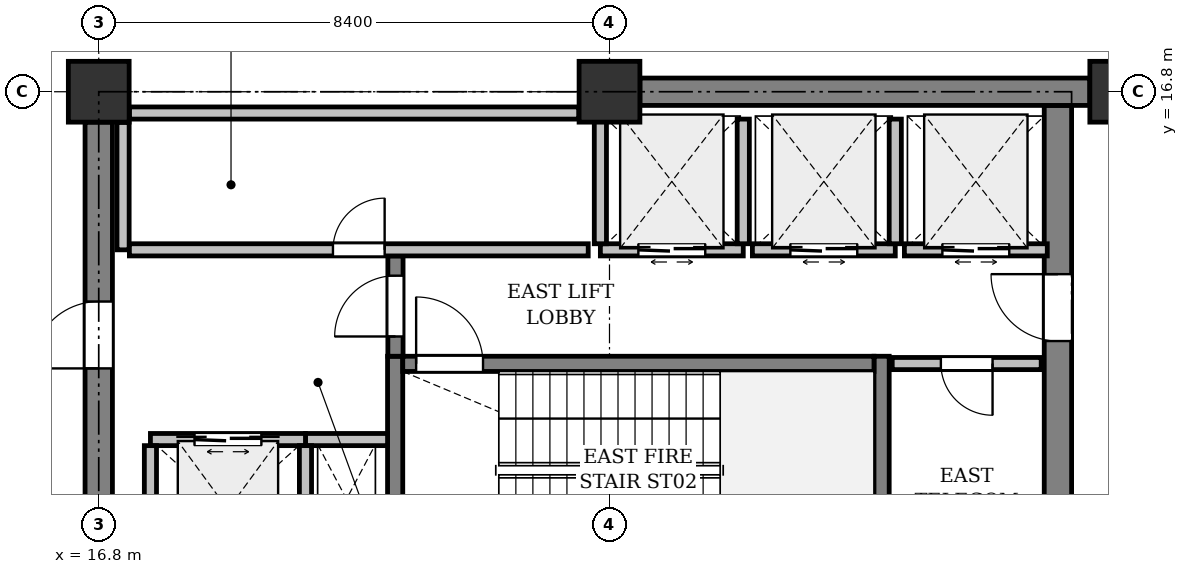
"""IFC4 building model, lengths in metres.
Left out: names, types, materials, properties, quantities, classifications, styles, units other than length and angle.
Written with IfcOpenShell. Run it as: python <this file> out.ifc"""

import sys

from ifc_helpers import new_model, si_unit, direction, frame, frame_2d, origin, origin_2d, place, context, subcontext, project, spatial, rectangle, extrude, element, fill, save


model = new_model("IFC4")
c1 = context("Model", 3, precision=1e-05, world=origin(), true_north=direction((0.0, 1.0)))
c2 = subcontext(c1, "Body", "Model", "MODEL_VIEW")
j1 = project(units=[si_unit("LENGTHUNIT", "METRE"), si_unit("PLANEANGLEUNIT", "RADIAN")], contexts=[c1])
p1 = place(None, origin())
s1 = spatial("IfcSite", under=j1, at=p1, CompositionType="ELEMENT")
p2 = place(p1, origin())
s2 = spatial("IfcBuilding", under=s1, at=p2, CompositionType="ELEMENT")
p3 = place(p2, frame((0.0, 0.0, 245.2)))
s3 = spatial("IfcBuildingStorey", under=s2, at=p3, CompositionType="ELEMENT", Elevation=245.2)
for number, where, z_axis, x_axis in (
    (1, (16.8, 16.8, 0.0), (0.0, 0.0, 1.0), (1.0, 0.0, 0.0)),
    (2, (25.2, 16.8, 0.0), (0.0, 0.0, 1.0), (1.0, 0.0, 0.0)),
    (3, (33.6, 16.8, 0.0), (0.0, 0.0, 1.0), (1.0, 0.0, 0.0)),
):
    element("IfcColumn", number, at=place(p3, frame(where, z_axis=z_axis, x_axis=x_axis)), inside=s3, PredefinedType="COLUMN", context=c2, shape_type="SweptSolid", body=[
        extrude(rectangle(XDim=1.0, YDim=1.0, at=origin_2d()), origin(), (0.0, 0.0, 1.0), 5.0),
    ])
p4 = place(p3, frame((32.575, 8.625, 0.0), z_axis=(0.0, 0.0, 1.0), x_axis=(0.0, 1.0, 0.0)))
e4 = element("IfcWall", 4, at=p4, inside=s3, PredefinedType="SHEAR", context=c2, shape_type="SweptSolid", body=[
    extrude(rectangle(XDim=7.95, YDim=0.45, at=frame_2d((3.975, 0.0))), origin(), (0.0, 0.0, 1.0), 4.725),
])
p5 = place(p4, frame((4.075, 0.0, 0.0)))
e5 = element("IfcOpeningElement", 5, at=p5, cuts=e4, PredefinedType="OPENING", context=c2, shape_type="SweptSolid", body=[
    extrude(rectangle(XDim=1.1, YDim=2.15, at=frame_2d((0.55, 1.075))), frame((0.0, 0.235, 0.0), z_axis=(0.0, -1.0, 0.0), x_axis=(1.0, 0.0, 0.0)), (0.0, 0.0, 1.0), 0.47),
])
p6 = place(p3, frame((16.8, 8.9, 0.0), z_axis=(0.0, 0.0, 1.0), x_axis=(0.0, 1.0, 0.0)))
e6 = element("IfcWall", 6, at=p6, inside=s3, PredefinedType="SHEAR", context=c2, shape_type="SweptSolid", body=[
    extrude(rectangle(XDim=7.4, YDim=0.45, at=frame_2d((3.7, 0.0))), origin(), (0.0, 0.0, 1.0), 4.725),
])
p7 = place(p6, frame((3.35, 0.0, 0.0)))
e7 = element("IfcOpeningElement", 7, at=p7, cuts=e6, PredefinedType="OPENING", context=c2, shape_type="SweptSolid", body=[
    extrude(rectangle(XDim=1.1, YDim=2.15, at=frame_2d((0.55, 1.075))), frame((0.0, 0.235, 0.0), z_axis=(0.0, -1.0, 0.0), x_axis=(1.0, 0.0, 0.0)), (0.0, 0.0, 1.0), 0.47),
])
p8 = place(p3, frame((25.7, 16.8, 0.0), z_axis=(0.0, 0.0, 1.0), x_axis=(1.0, 0.0, 0.0)))
e8 = element("IfcWall", 8, at=p8, inside=s3, PredefinedType="SHEAR", context=c2, shape_type="SweptSolid", body=[
    extrude(rectangle(XDim=7.4, YDim=0.45, at=frame_2d((3.7, 0.0))), origin(), (0.0, 0.0, 1.0), 4.725),
])
for number, where, z_axis, x_axis in (
    (9, (21.675, 8.7, 0.0), (0.0, 0.0, 1.0), (0.0, 1.0, 0.0)),
    (10, (29.675, 8.7, 0.0), (0.0, 0.0, 1.0), (0.0, 1.0, 0.0)),
):
    element("IfcWall", number, at=place(p3, frame(where, z_axis=z_axis, x_axis=x_axis)), inside=s3, PredefinedType="SHEAR", context=c2, shape_type="SweptSolid", body=[
        extrude(rectangle(XDim=3.75, YDim=0.25, at=frame_2d((1.875, 0.0))), origin(), (0.0, 0.0, 1.0), 4.725),
    ])
p9 = place(p3, frame((21.8, 12.325, 0.0), z_axis=(0.0, 0.0, 1.0), x_axis=(1.0, 0.0, 0.0)))
e11 = element("IfcWall", 11, at=p9, inside=s3, PredefinedType="SHEAR", context=c2, shape_type="SweptSolid", body=[
    extrude(rectangle(XDim=7.75, YDim=0.25, at=frame_2d((3.875, 0.0))), origin(), (0.0, 0.0, 1.0), 4.725),
])
p10 = place(p9, frame((0.22, 0.0, 0.0)))
e12 = element("IfcOpeningElement", 12, at=p10, cuts=e11, PredefinedType="OPENING", context=c2, shape_type="SweptSolid", body=[
    extrude(rectangle(XDim=1.1, YDim=2.15, at=frame_2d((0.55, 1.075))), frame((0.0, 0.135, 0.0), z_axis=(0.0, -1.0, 0.0), x_axis=(1.0, 0.0, 0.0)), (0.0, 0.0, 1.0), 0.27),
])
p11 = place(p3, frame((20.2, 11.08, 0.0), z_axis=(0.0, 0.0, 1.0), x_axis=(1.0, 0.0, 0.0)))
e13 = element("IfcWall", 13, at=p11, inside=s3, PredefinedType="PARTITIONING", context=c2, shape_type="SweptSolid", body=[
    extrude(rectangle(XDim=1.35, YDim=0.2, at=frame_2d((0.675, 0.0))), origin(), (0.0, 0.0, 1.0), 4.725),
])
p12 = place(p3, frame((21.68, 12.45, 0.0), z_axis=(0.0, 0.0, 1.0), x_axis=(0.0, 1.0, 0.0)))
e14 = element("IfcWall", 14, at=p12, inside=s3, PredefinedType="SHEAR", context=c2, shape_type="SweptSolid", body=[
    extrude(rectangle(XDim=1.65, YDim=0.25, at=frame_2d((0.825, 0.0))), origin(), (0.0, 0.0, 1.0), 4.725),
])
p13 = place(p12, frame((0.325, 0.0, 0.0)))
e15 = element("IfcOpeningElement", 15, at=p13, cuts=e14, PredefinedType="OPENING", context=c2, shape_type="SweptSolid", body=[
    extrude(rectangle(XDim=1.0, YDim=2.15, at=frame_2d((0.5, 1.075))), frame((0.0, 0.135, 0.0), z_axis=(0.0, -1.0, 0.0), x_axis=(1.0, 0.0, 0.0)), (0.0, 0.0, 1.0), 0.27),
])
p14 = place(p3, frame((17.65, 11.08, 0.0), z_axis=(0.0, 0.0, 1.0), x_axis=(1.0, 0.0, 0.0)))
e16 = element("IfcWall", 16, at=p14, inside=s3, PredefinedType="PARTITIONING", context=c2, shape_type="SweptSolid", body=[
    extrude(rectangle(XDim=2.55, YDim=0.2, at=frame_2d((1.275, 0.0))), origin(), (0.0, 0.0, 1.0), 4.725),
])
p15 = place(p14, frame((0.725, 0.0, 0.0)))
e17 = element("IfcOpeningElement", 17, at=p15, cuts=e16, PredefinedType="OPENING", context=c2, shape_type="SweptSolid", body=[
    extrude(rectangle(XDim=1.1, YDim=2.2, at=frame_2d((0.55, 1.1))), frame((0.0, 0.11, 0.0), z_axis=(0.0, -1.0, 0.0), x_axis=(1.0, 0.0, 0.0)), (0.0, 0.0, 1.0), 0.22),
])
for number, where, z_axis, x_axis in (
    (18, (20.2, 8.88, 0.0), (0.0, 0.0, 1.0), (0.0, 1.0, 0.0)),
    (19, (17.65, 8.88, 0.0), (0.0, 0.0, 1.0), (0.0, 1.0, 0.0)),
):
    element("IfcWall", number, at=place(p3, frame(where, z_axis=z_axis, x_axis=x_axis)), inside=s3, PredefinedType="PARTITIONING", context=c2, shape_type="SweptSolid", body=[
        extrude(rectangle(XDim=2.1, YDim=0.2, at=frame_2d((1.05, 0.0))), origin(), (0.0, 0.0, 1.0), 4.725),
    ])
p16 = place(p3, frame((25.05, 14.2, 0.0), z_axis=(0.0, 0.0, 1.0), x_axis=(1.0, 0.0, 0.0)))
e20 = element("IfcWall", 20, at=p16, inside=s3, PredefinedType="PARTITIONING", context=c2, shape_type="SweptSolid", body=[
    extrude(rectangle(XDim=2.35, YDim=0.2, at=frame_2d((1.175, 0.0))), origin(), (0.0, 0.0, 1.0), 4.725),
])
p17 = place(p16, frame((0.625, 0.0, 0.0)))
e21 = element("IfcOpeningElement", 21, at=p17, cuts=e20, PredefinedType="OPENING", context=c2, shape_type="SweptSolid", body=[
    extrude(rectangle(XDim=1.1, YDim=2.2, at=frame_2d((0.55, 1.1))), frame((0.0, 0.11, 0.0), z_axis=(0.0, -1.0, 0.0), x_axis=(1.0, 0.0, 0.0)), (0.0, 0.0, 1.0), 0.22),
])
for number, where, z_axis, x_axis in (
    (22, (27.4, 14.3, 0.0), (0.0, 0.0, 1.0), (0.0, 1.0, 0.0)),
    (23, (25.05, 14.3, 0.0), (0.0, 0.0, 1.0), (0.0, 1.0, 0.0)),
):
    element("IfcWall", number, at=place(p3, frame(where, z_axis=z_axis, x_axis=x_axis)), inside=s3, PredefinedType="PARTITIONING", context=c2, shape_type="SweptSolid", body=[
        extrude(rectangle(XDim=2.05, YDim=0.2, at=frame_2d((1.025, 0.0))), origin(), (0.0, 0.0, 1.0), 4.725),
    ])
p18 = place(p3, frame((27.55, 14.2, 0.0), z_axis=(0.0, 0.0, 1.0), x_axis=(1.0, 0.0, 0.0)))
e24 = element("IfcWall", 24, at=p18, inside=s3, PredefinedType="PARTITIONING", context=c2, shape_type="SweptSolid", body=[
    extrude(rectangle(XDim=2.35, YDim=0.2, at=frame_2d((1.175, 0.0))), origin(), (0.0, 0.0, 1.0), 4.725),
])
p19 = place(p18, frame((0.625, 0.0, 0.0)))
e25 = element("IfcOpeningElement", 25, at=p19, cuts=e24, PredefinedType="OPENING", context=c2, shape_type="SweptSolid", body=[
    extrude(rectangle(XDim=1.1, YDim=2.2, at=frame_2d((0.55, 1.1))), frame((0.0, 0.11, 0.0), z_axis=(0.0, -1.0, 0.0), x_axis=(1.0, 0.0, 0.0)), (0.0, 0.0, 1.0), 0.22),
])
p20 = place(p3, frame((29.9, 14.3, 0.0), z_axis=(0.0, 0.0, 1.0), x_axis=(0.0, 1.0, 0.0)))
e26 = element("IfcWall", 26, at=p20, inside=s3, PredefinedType="PARTITIONING", context=c2, shape_type="SweptSolid", body=[
    extrude(rectangle(XDim=2.05, YDim=0.2, at=frame_2d((1.025, 0.0))), origin(), (0.0, 0.0, 1.0), 4.725),
])
p21 = place(p3, frame((30.05, 14.2, 0.0), z_axis=(0.0, 0.0, 1.0), x_axis=(1.0, 0.0, 0.0)))
e27 = element("IfcWall", 27, at=p21, inside=s3, PredefinedType="PARTITIONING", context=c2, shape_type="SweptSolid", body=[
    extrude(rectangle(XDim=2.35, YDim=0.2, at=frame_2d((1.175, 0.0))), origin(), (0.0, 0.0, 1.0), 4.725),
])
p22 = place(p21, frame((0.625, 0.0, 0.0)))
e28 = element("IfcOpeningElement", 28, at=p22, cuts=e27, PredefinedType="OPENING", context=c2, shape_type="SweptSolid", body=[
    extrude(rectangle(XDim=1.1, YDim=2.2, at=frame_2d((0.55, 1.1))), frame((0.0, 0.11, 0.0), z_axis=(0.0, -1.0, 0.0), x_axis=(1.0, 0.0, 0.0)), (0.0, 0.0, 1.0), 0.22),
])
p23 = place(p3, frame((24.695, 16.45, 0.0), z_axis=(0.0, 0.0, 1.0), x_axis=(-1.0, 0.0, 0.0)))
e29 = element("IfcWall", 29, at=p23, inside=s3, PredefinedType="PARTITIONING", context=c2, shape_type="SweptSolid", body=[
    extrude(rectangle(XDim=7.39, YDim=0.2, at=frame_2d((3.695, 0.0))), origin(), (0.0, 0.0, 1.0), 4.725),
])
p24 = place(p3, frame((17.2, 16.295, 0.0), z_axis=(0.0, 0.0, 1.0), x_axis=(0.0, -1.0, 0.0)))
e30 = element("IfcWall", 30, at=p24, inside=s3, PredefinedType="PARTITIONING", context=c2, shape_type="SweptSolid", body=[
    extrude(rectangle(XDim=2.095, YDim=0.2, at=frame_2d((1.047, 0.0))), origin(), (0.0, 0.0, 1.0), 4.725),
])
p25 = place(p3, frame((17.304, 14.2, 0.0), z_axis=(0.0, 0.0, 1.0), x_axis=(1.0, 0.0, 0.0)))
e31 = element("IfcWall", 31, at=p25, inside=s3, PredefinedType="PARTITIONING", context=c2, shape_type="SweptSolid", body=[
    extrude(rectangle(XDim=7.546, YDim=0.2, at=frame_2d((3.773, 0.0))), origin(), (0.0, 0.0, 1.0), 4.725),
])
p26 = place(p25, frame((3.348, 0.0, 0.0)))
e32 = element("IfcOpeningElement", 32, at=p26, cuts=e31, PredefinedType="OPENING", context=c2, shape_type="SweptSolid", body=[
    extrude(rectangle(XDim=0.85, YDim=2.15, at=frame_2d((0.425, 1.075))), frame((0.0, 0.11, 0.0), z_axis=(0.0, -1.0, 0.0), x_axis=(1.0, 0.0, 0.0)), (0.0, 0.0, 1.0), 0.22),
])
p27 = place(p3, frame((32.3, 12.33, 0.0), z_axis=(0.0, 0.0, 1.0), x_axis=(-1.0, 0.0, 0.0)))
e33 = element("IfcWall", 33, at=p27, inside=s3, PredefinedType="PARTITIONING", context=c2, shape_type="SweptSolid", body=[
    extrude(rectangle(XDim=2.45, YDim=0.2, at=frame_2d((1.225, 0.0))), origin(), (0.0, 0.0, 1.0), 4.725),
])
p28 = place(p27, frame((0.8, 0.0, 0.0)))
e34 = element("IfcOpeningElement", 34, at=p28, cuts=e33, PredefinedType="OPENING", context=c2, shape_type="SweptSolid", body=[
    extrude(rectangle(XDim=0.85, YDim=2.15, at=frame_2d((0.425, 1.075))), frame((0.0, 0.11, 0.0), z_axis=(0.0, -1.0, 0.0), x_axis=(1.0, 0.0, 0.0)), (0.0, 0.0, 1.0), 0.22),
])
p29 = place(p5, origin())
e35 = element("IfcDoor", 35, at=p29, inside=s3, OperationType="SINGLE_SWING_RIGHT", PredefinedType="DOOR", context=c2, shape_type="SweptSolid", body=[
    extrude(rectangle(XDim=1.1, YDim=2.15, at=frame_2d((0.55, 1.075))), frame((0.0, 0.025, 0.0), z_axis=(0.0, -1.0, 0.0), x_axis=(1.0, 0.0, 0.0)), (0.0, 0.0, 1.0), 0.05),
])
fill(e5, e35)
p30 = place(p7, origin())
e36 = element("IfcDoor", 36, at=p30, inside=s3, OperationType="SINGLE_SWING_LEFT", PredefinedType="DOOR", context=c2, shape_type="SweptSolid", body=[
    extrude(rectangle(XDim=1.1, YDim=2.15, at=frame_2d((0.55, 1.075))), frame((0.0, 0.025, 0.0), z_axis=(0.0, -1.0, 0.0), x_axis=(1.0, 0.0, 0.0)), (0.0, 0.0, 1.0), 0.05),
])
fill(e7, e36)
p31 = place(p10, origin())
e37 = element("IfcDoor", 37, at=p31, inside=s3, OperationType="SINGLE_SWING_LEFT", PredefinedType="DOOR", context=c2, shape_type="SweptSolid", body=[
    extrude(rectangle(XDim=1.1, YDim=2.15, at=frame_2d((0.55, 1.075))), frame((0.0, 0.025, 0.0), z_axis=(0.0, -1.0, 0.0), x_axis=(1.0, 0.0, 0.0)), (0.0, 0.0, 1.0), 0.05),
])
fill(e12, e37)
p32 = place(p13, origin())
e38 = element("IfcDoor", 38, at=p32, inside=s3, OperationType="SINGLE_SWING_LEFT", PredefinedType="DOOR", context=c2, shape_type="SweptSolid", body=[
    extrude(rectangle(XDim=1.0, YDim=2.15, at=frame_2d((0.5, 1.075))), frame((0.0, 0.025, 0.0), z_axis=(0.0, -1.0, 0.0), x_axis=(1.0, 0.0, 0.0)), (0.0, 0.0, 1.0), 0.05),
])
fill(e15, e38)
p33 = place(p15, origin())
e39 = element("IfcDoor", 39, at=p33, inside=s3, OperationType="DOUBLE_DOOR_SLIDING", PredefinedType="DOOR", context=c2, shape_type="SweptSolid", body=[
    extrude(rectangle(XDim=1.1, YDim=2.2, at=frame_2d((0.55, 1.1))), frame((0.0, 0.025, 0.0), z_axis=(0.0, -1.0, 0.0), x_axis=(1.0, 0.0, 0.0)), (0.0, 0.0, 1.0), 0.05),
])
fill(e17, e39)
p34 = place(p17, origin())
e40 = element("IfcDoor", 40, at=p34, inside=s3, OperationType="DOUBLE_DOOR_SLIDING", PredefinedType="DOOR", context=c2, shape_type="SweptSolid", body=[
    extrude(rectangle(XDim=1.1, YDim=2.2, at=frame_2d((0.55, 1.1))), frame((0.0, 0.025, 0.0), z_axis=(0.0, -1.0, 0.0), x_axis=(1.0, 0.0, 0.0)), (0.0, 0.0, 1.0), 0.05),
])
fill(e21, e40)
p35 = place(p19, origin())
e41 = element("IfcDoor", 41, at=p35, inside=s3, OperationType="DOUBLE_DOOR_SLIDING", PredefinedType="DOOR", context=c2, shape_type="SweptSolid", body=[
    extrude(rectangle(XDim=1.1, YDim=2.2, at=frame_2d((0.55, 1.1))), frame((0.0, 0.025, 0.0), z_axis=(0.0, -1.0, 0.0), x_axis=(1.0, 0.0, 0.0)), (0.0, 0.0, 1.0), 0.05),
])
fill(e25, e41)
p36 = place(p22, origin())
e42 = element("IfcDoor", 42, at=p36, inside=s3, OperationType="DOUBLE_DOOR_SLIDING", PredefinedType="DOOR", context=c2, shape_type="SweptSolid", body=[
    extrude(rectangle(XDim=1.1, YDim=2.2, at=frame_2d((0.55, 1.1))), frame((0.0, 0.025, 0.0), z_axis=(0.0, -1.0, 0.0), x_axis=(1.0, 0.0, 0.0)), (0.0, 0.0, 1.0), 0.05),
])
fill(e28, e42)
p37 = place(p26, origin())
e43 = element("IfcDoor", 43, at=p37, inside=s3, OperationType="SINGLE_SWING_RIGHT", PredefinedType="DOOR", context=c2, shape_type="SweptSolid", body=[
    extrude(rectangle(XDim=0.85, YDim=2.15, at=frame_2d((0.425, 1.075))), frame((0.0, 0.025, 0.0), z_axis=(0.0, -1.0, 0.0), x_axis=(1.0, 0.0, 0.0)), (0.0, 0.0, 1.0), 0.05),
])
fill(e32, e43)
p38 = place(p28, origin())
e44 = element("IfcDoor", 44, at=p38, inside=s3, OperationType="SINGLE_SWING_LEFT", PredefinedType="DOOR", context=c2, shape_type="SweptSolid", body=[
    extrude(rectangle(XDim=0.85, YDim=2.15, at=frame_2d((0.425, 1.075))), frame((0.0, 0.025, 0.0), z_axis=(0.0, -1.0, 0.0), x_axis=(1.0, 0.0, 0.0)), (0.0, 0.0, 1.0), 0.05),
])
fill(e34, e44)
save(model, sys.argv[1])
